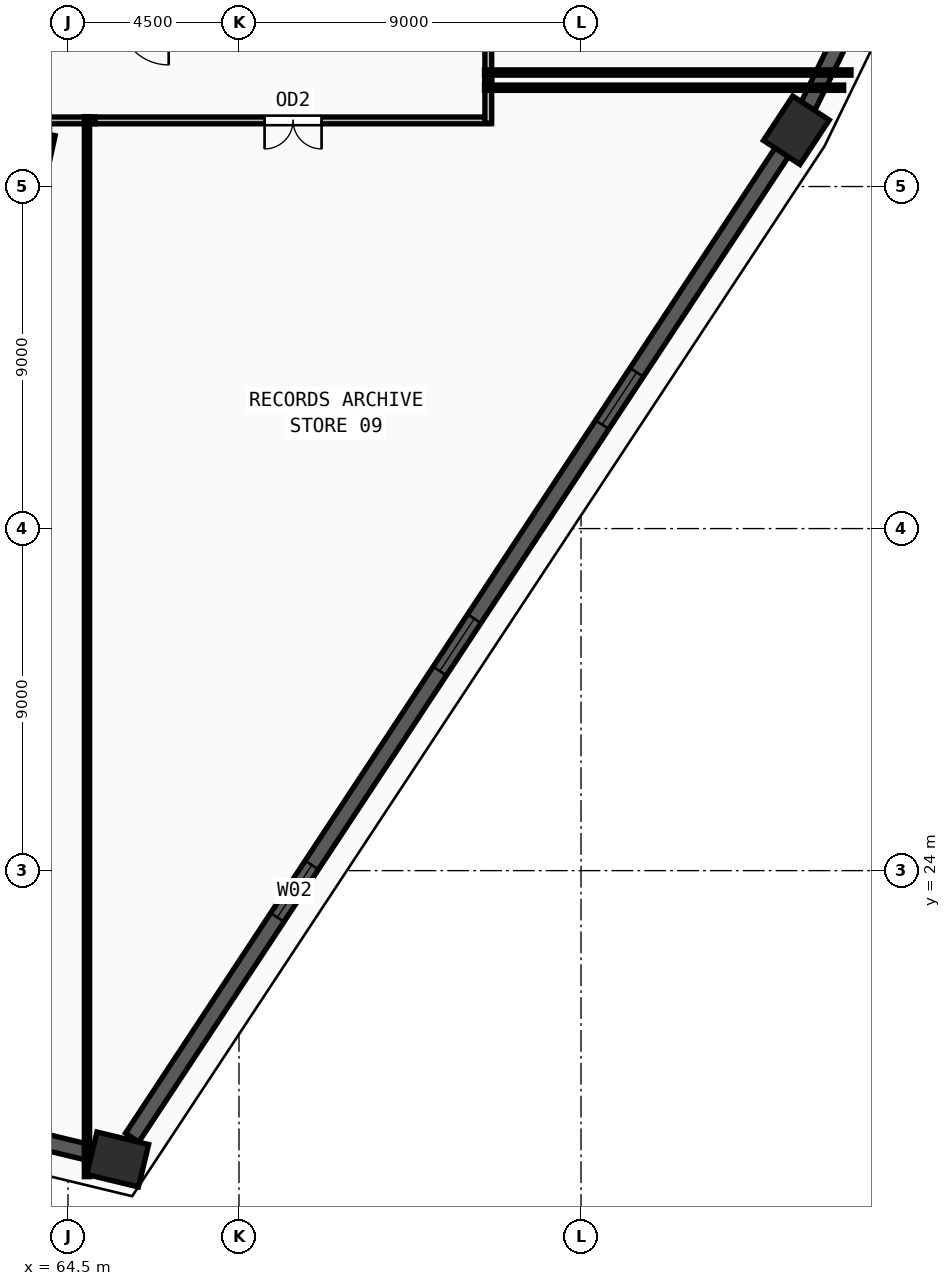
"""IFC4 building model, lengths in metres.
Left out: names, types, materials, properties, quantities, classifications, styles, units other than length and angle.
Written with IfcOpenShell. Run it as: python <this file> out.ifc"""

import sys

from ifc_helpers import new_model, si_unit, direction, frame, frame_2d, origin, origin_2d, place, context, subcontext, project, spatial, rectangle, extrude, source, transform, mapped, element, fill, save


model = new_model("IFC4")
c1 = context("Model", 3, precision=1e-05, world=origin(), true_north=direction((0.0, 1.0)))
c2 = subcontext(c1, "Body", "Model", "MODEL_VIEW")
j1 = project(units=[si_unit("LENGTHUNIT", "METRE"), si_unit("PLANEANGLEUNIT", "RADIAN")], contexts=[c1])
p1 = place(None, origin())
s1 = spatial("IfcSite", under=j1, at=p1, CompositionType="ELEMENT")
p2 = place(p1, origin())
s2 = spatial("IfcBuilding", under=s1, at=p2, CompositionType="ELEMENT")
p3 = place(p2, frame((0.0, 0.0, 144.0)))
s3 = spatial("IfcBuildingStorey", under=s2, at=p3, CompositionType="ELEMENT", Elevation=144.0)
m1 = source(origin(), c2, "Body", "SweptSolid", [
    extrude(rectangle(XDim=1.4, YDim=1.15, at=origin_2d()), origin(), (0.0, 0.0, 1.0), 3.75),
])
for number, where, z_axis, x_axis in (
    (1, (83.666, 43.481, 0.0), (0.0, 0.0, 1.0), (0.55, 0.835, 0.0)),
    (2, (65.808, 16.399, 0.0), (0.0, 0.0, 1.0), (-0.972, 0.235, 0.0)),
):
    element("IfcColumn", number, at=place(p3, frame(where, z_axis=z_axis, x_axis=x_axis)), inside=s3, PredefinedType="COLUMN", context=c2, shape_type="MappedRepresentation", body=[
        mapped(m1, transform((0.0, 0.0, 0.0), x_axis=(1.0, 0.0, 0.0), y_axis=(0.0, 1.0, 0.0), z_axis=(0.0, 0.0, 1.0), scale=1.0)),
    ])
p4 = place(p3, frame((60.671, 17.64, 0.0), z_axis=(0.0, 0.0, 1.0), x_axis=(0.972040399781, -0.234813673352, 0.0)))
e3 = element("IfcWall", 3, at=p4, inside=s3, PredefinedType="SOLIDWALL", context=c2, shape_type="SweptSolid", body=[
    extrude(rectangle(XDim=4.594, YDim=0.42, at=frame_2d((2.297, 0.0))), origin(), (0.0, 0.0, 1.0), 3.57),
])
m2 = source(origin(), c2, "Body", "SweptSolid", [
    extrude(rectangle(XDim=1.2, YDim=1.9, at=frame_2d((0.6, 0.95))), frame((0.0, 0.22, 0.0), z_axis=(0.0, -1.0, 0.0), x_axis=(1.0, 0.0, 0.0)), (0.0, 0.0, 1.0), 0.44),
])
p5 = place(p4, frame((1.697, 0.0, 0.55)))
e4 = element("IfcOpeningElement", 4, at=p5, cuts=e3, PredefinedType="OPENING", context=c2, shape_type="MappedRepresentation", body=[
    mapped(m2, transform((0.0, 0.0, 0.0), x_axis=(1.0, 0.0, 0.0), y_axis=(0.0, 1.0, 0.0), z_axis=(0.0, 0.0, 1.0), scale=1.0)),
])
p6 = place(p3, frame((66.188, 16.975, 0.0), z_axis=(0.0, 0.0, 1.0), x_axis=(0.550486590195, 0.834844005797, 0.0)))
e5 = element("IfcWall", 5, at=p6, inside=s3, PredefinedType="SOLIDWALL", context=c2, shape_type="SweptSolid", body=[
    extrude(rectangle(XDim=31.06, YDim=0.42, at=frame_2d((15.53, 0.0))), origin(), (0.0, 0.0, 1.0), 3.57),
])
m3 = source(origin(), c2, "Body", "SweptSolid", [
    extrude(rectangle(XDim=1.65, YDim=1.95, at=frame_2d((0.825, 0.975))), frame((0.0, 0.22, 0.0), z_axis=(0.0, -1.0, 0.0), x_axis=(1.0, 0.0, 0.0)), (0.0, 0.0, 1.0), 0.44),
])
p7 = place(p6, frame((6.94, 0.0, 0.55)))
e6 = element("IfcOpeningElement", 6, at=p7, cuts=e5, PredefinedType="OPENING", context=c2, shape_type="MappedRepresentation", body=[
    mapped(m3, transform((0.0, 0.0, 0.0), x_axis=(1.0, 0.0, 0.0), y_axis=(0.0, 1.0, 0.0), z_axis=(0.0, 0.0, 1.0), scale=1.0)),
])
p8 = place(p6, frame((14.705, 0.0, 0.55)))
e7 = element("IfcOpeningElement", 7, at=p8, cuts=e5, PredefinedType="OPENING", context=c2, shape_type="MappedRepresentation", body=[
    mapped(m3, transform((0.0, 0.0, 0.0), x_axis=(1.0, 0.0, 0.0), y_axis=(0.0, 1.0, 0.0), z_axis=(0.0, 0.0, 1.0), scale=1.0)),
])
p9 = place(p6, frame((22.47, 0.0, 0.55)))
e8 = element("IfcOpeningElement", 8, at=p9, cuts=e5, PredefinedType="OPENING", context=c2, shape_type="MappedRepresentation", body=[
    mapped(m3, transform((0.0, 0.0, 0.0), x_axis=(1.0, 0.0, 0.0), y_axis=(0.0, 1.0, 0.0), z_axis=(0.0, 0.0, 1.0), scale=1.0)),
])
p10 = place(p3, frame((83.968, 44.102, 0.0), z_axis=(0.0, 0.0, 1.0), x_axis=(0.437237241279, 0.899346204105, 0.0)))
e9 = element("IfcWall", 9, at=p10, inside=s3, PredefinedType="SOLIDWALL", context=c2, shape_type="SweptSolid", body=[
    extrude(rectangle(XDim=25.62, YDim=0.42, at=frame_2d((12.81, 0.0))), origin(), (0.0, 0.0, 1.0), 3.57),
])
p11 = place(p10, frame((5.58, 0.0, 0.55)))
e10 = element("IfcOpeningElement", 10, at=p11, cuts=e9, PredefinedType="OPENING", context=c2, shape_type="MappedRepresentation", body=[
    mapped(m3, transform((0.0, 0.0, 0.0), x_axis=(1.0, 0.0, 0.0), y_axis=(0.0, 1.0, 0.0), z_axis=(0.0, 0.0, 1.0), scale=1.0)),
])
p12 = place(p10, frame((18.39, 0.0, 0.55)))
e11 = element("IfcOpeningElement", 11, at=p12, cuts=e9, PredefinedType="OPENING", context=c2, shape_type="MappedRepresentation", body=[
    mapped(m3, transform((0.0, 0.0, 0.0), x_axis=(1.0, 0.0, 0.0), y_axis=(0.0, 1.0, 0.0), z_axis=(0.0, 0.0, 1.0), scale=1.0)),
])
p13 = place(p3, frame((64.016, 43.37, 0.0), z_axis=(0.0, 0.0, 1.0), x_axis=(-0.21138112539, -0.97740371384, 0.0)))
e12 = element("IfcWall", 12, at=p13, inside=s3, PredefinedType="SOLIDWALL", context=c2, shape_type="SweptSolid", body=[
    extrude(rectangle(XDim=6.652, YDim=0.3, at=frame_2d((3.326, 0.0))), origin(), (0.0, 0.0, 1.0), 3.57),
])
m4 = source(origin(), c2, "Body", "SweptSolid", [
    extrude(rectangle(XDim=2.0, YDim=1.9, at=frame_2d((1.0, 0.95))), frame((0.0, 0.16, 0.0), z_axis=(0.0, -1.0, 0.0), x_axis=(1.0, 0.0, 0.0)), (0.0, 0.0, 1.0), 0.32),
])
p14 = place(p13, frame((2.326, 0.0, 0.55)))
e13 = element("IfcOpeningElement", 13, at=p14, cuts=e12, PredefinedType="OPENING", context=c2, shape_type="MappedRepresentation", body=[
    mapped(m4, transform((0.0, 0.0, 0.0), x_axis=(1.0, 0.0, 0.0), y_axis=(0.0, 1.0, 0.0), z_axis=(0.0, 0.0, 1.0), scale=1.0)),
])
p15 = place(p3, frame((65.215, 43.74, 0.0), z_axis=(0.0, 0.0, 1.0), x_axis=(-1.0, 0.0, 0.0)))
e14 = element("IfcWall", 14, at=p15, inside=s3, PredefinedType="PARTITIONING", context=c2, shape_type="SweptSolid", body=[
    extrude(rectangle(XDim=20.845, YDim=0.18, at=frame_2d((10.422, 0.0))), origin(), (0.0, 0.0, 1.0), 3.57),
])
m5 = source(origin(), c2, "Body", "SweptSolid", [
    extrude(rectangle(XDim=1.5, YDim=2.2, at=frame_2d((0.75, 1.1))), frame((0.0, 0.1, 0.0), z_axis=(0.0, -1.0, 0.0), x_axis=(1.0, 0.0, 0.0)), (0.0, 0.0, 1.0), 0.2),
])
p16 = place(p15, frame((9.673, 0.0, 0.0)))
e15 = element("IfcOpeningElement", 15, at=p16, cuts=e14, PredefinedType="OPENING", context=c2, shape_type="MappedRepresentation", body=[
    mapped(m5, transform((0.0, 0.0, 0.0), x_axis=(1.0, 0.0, 0.0), y_axis=(0.0, 1.0, 0.0), z_axis=(0.0, 0.0, 1.0), scale=1.0)),
])
p17 = place(p3, frame((75.63, 43.74, 0.0), z_axis=(0.0, 0.0, 1.0), x_axis=(-1.0, 0.0, 0.0)))
e16 = element("IfcWall", 16, at=p17, inside=s3, PredefinedType="PARTITIONING", context=c2, shape_type="SweptSolid", body=[
    extrude(rectangle(XDim=10.415, YDim=0.18, at=frame_2d((5.208, 0.0))), origin(), (0.0, 0.0, 1.0), 3.57),
])
p18 = place(p17, frame((4.457, 0.0, 0.0)))
e17 = element("IfcOpeningElement", 17, at=p18, cuts=e16, PredefinedType="OPENING", context=c2, shape_type="MappedRepresentation", body=[
    mapped(m5, transform((0.0, 0.0, 0.0), x_axis=(1.0, 0.0, 0.0), y_axis=(0.0, 1.0, 0.0), z_axis=(0.0, 0.0, 1.0), scale=1.0)),
])
p19 = place(p3, frame((75.56, 52.715, 0.0), z_axis=(0.0, 0.0, 1.0), x_axis=(0.0, -1.0, 0.0)))
e18 = element("IfcWall", 18, at=p19, inside=s3, PredefinedType="PARTITIONING", context=c2, shape_type="SweptSolid", body=[
    extrude(rectangle(XDim=7.93, YDim=0.18, at=frame_2d((3.965, 0.0))), origin(), (0.0, 0.0, 1.0), 3.155),
])
m6 = source(origin(), c2, "Body", "SweptSolid", [
    extrude(rectangle(XDim=1.0, YDim=2.2, at=frame_2d((0.5, 1.1))), frame((0.0, 0.1, 0.0), z_axis=(0.0, -1.0, 0.0), x_axis=(1.0, 0.0, 0.0)), (0.0, 0.0, 1.0), 0.2),
])
p20 = place(p19, frame((3.465, 0.0, 0.0)))
e19 = element("IfcOpeningElement", 19, at=p20, cuts=e18, PredefinedType="OPENING", context=c2, shape_type="MappedRepresentation", body=[
    mapped(m6, transform((0.0, 0.0, 0.0), x_axis=(1.0, 0.0, 0.0), y_axis=(0.0, 1.0, 0.0), z_axis=(0.0, 0.0, 1.0), scale=1.0)),
])
p21 = place(p3, frame((75.56, 44.785, 0.0), z_axis=(0.0, 0.0, 1.0), x_axis=(0.0, -1.0, 0.0)))
e20 = element("IfcWall", 20, at=p21, inside=s3, PredefinedType="PARTITIONING", context=c2, shape_type="SweptSolid", body=[
    extrude(rectangle(XDim=1.115, YDim=0.18, at=frame_2d((0.558, 0.0))), origin(), (0.0, 0.0, 1.0), 3.57),
])
p22 = place(p3, frame((75.46, 44.6, 0.0), z_axis=(0.0, 0.0, 1.0), x_axis=(1.0, 0.0, 0.0)))
e21 = element("IfcWall", 21, at=p22, inside=s3, PredefinedType="PARTITIONING", context=c2, shape_type="SweptSolid", body=[
    extrude(rectangle(XDim=9.451, YDim=0.14, at=frame_2d((4.726, 0.0))), origin(), (0.0, 0.0, 1.0), 3.57),
])
p23 = place(p3, frame((75.46, 45.0, 0.0), z_axis=(0.0, 0.0, 1.0), x_axis=(1.0, 0.0, 0.0)))
e22 = element("IfcWall", 22, at=p23, inside=s3, PredefinedType="PARTITIONING", context=c2, shape_type="SweptSolid", body=[
    extrude(rectangle(XDim=9.645, YDim=0.14, at=frame_2d((4.823, 0.0))), origin(), (0.0, 0.0, 1.0), 3.57),
])
p24 = place(p3, frame((65.0, 43.84, 0.0), z_axis=(0.0, 0.0, 1.0), x_axis=(0.0, -1.0, 0.0)))
e23 = element("IfcWall", 23, at=p24, inside=s3, PredefinedType="PARTITIONING", context=c2, shape_type="SweptSolid", body=[
    extrude(rectangle(XDim=27.893, YDim=0.14, at=frame_2d((13.947, 0.0))), origin(), (0.0, 0.0, 1.0), 3.57),
])
m7 = source(origin(), c2, "Body", "SweptSolid", [
    extrude(rectangle(XDim=1.65, YDim=1.95, at=frame_2d((0.825, 0.975))), frame((0.0, 0.03, 0.0), z_axis=(0.0, -1.0, 0.0), x_axis=(1.0, 0.0, 0.0)), (0.0, 0.0, 1.0), 0.06),
])
p25 = place(p7, origin())
e24 = element("IfcWindow", 24, at=p25, inside=s3, PartitioningType="DOUBLE_PANEL_VERTICAL", PredefinedType="WINDOW", context=c2, shape_type="MappedRepresentation", body=[
    mapped(m7, transform((0.0, 0.0, 0.0), x_axis=(1.0, 0.0, 0.0), y_axis=(0.0, 1.0, 0.0), z_axis=(0.0, 0.0, 1.0), scale=1.0)),
])
fill(e6, e24)
p26 = place(p8, origin())
e25 = element("IfcWindow", 25, at=p26, inside=s3, PartitioningType="DOUBLE_PANEL_VERTICAL", PredefinedType="WINDOW", context=c2, shape_type="MappedRepresentation", body=[
    mapped(m7, transform((0.0, 0.0, 0.0), x_axis=(1.0, 0.0, 0.0), y_axis=(0.0, 1.0, 0.0), z_axis=(0.0, 0.0, 1.0), scale=1.0)),
])
fill(e7, e25)
p27 = place(p9, origin())
e26 = element("IfcWindow", 26, at=p27, inside=s3, PartitioningType="DOUBLE_PANEL_VERTICAL", PredefinedType="WINDOW", context=c2, shape_type="MappedRepresentation", body=[
    mapped(m7, transform((0.0, 0.0, 0.0), x_axis=(1.0, 0.0, 0.0), y_axis=(0.0, 1.0, 0.0), z_axis=(0.0, 0.0, 1.0), scale=1.0)),
])
fill(e8, e26)
m8 = source(origin(), c2, "Body", "SweptSolid", [
    extrude(rectangle(XDim=1.5, YDim=2.2, at=frame_2d((0.75, 1.1))), frame((0.0, 0.025, 0.0), z_axis=(0.0, -1.0, 0.0), x_axis=(1.0, 0.0, 0.0)), (0.0, 0.0, 1.0), 0.05),
])
p28 = place(p18, origin())
e27 = element("IfcDoor", 27, at=p28, inside=s3, OperationType="DOUBLE_DOOR_SINGLE_SWING", PredefinedType="DOOR", context=c2, shape_type="MappedRepresentation", body=[
    mapped(m8, transform((0.0, 0.0, 0.0), x_axis=(1.0, 0.0, 0.0), y_axis=(0.0, 1.0, 0.0), z_axis=(0.0, 0.0, 1.0), scale=1.0)),
])
fill(e17, e27)
save(model, sys.argv[1])
